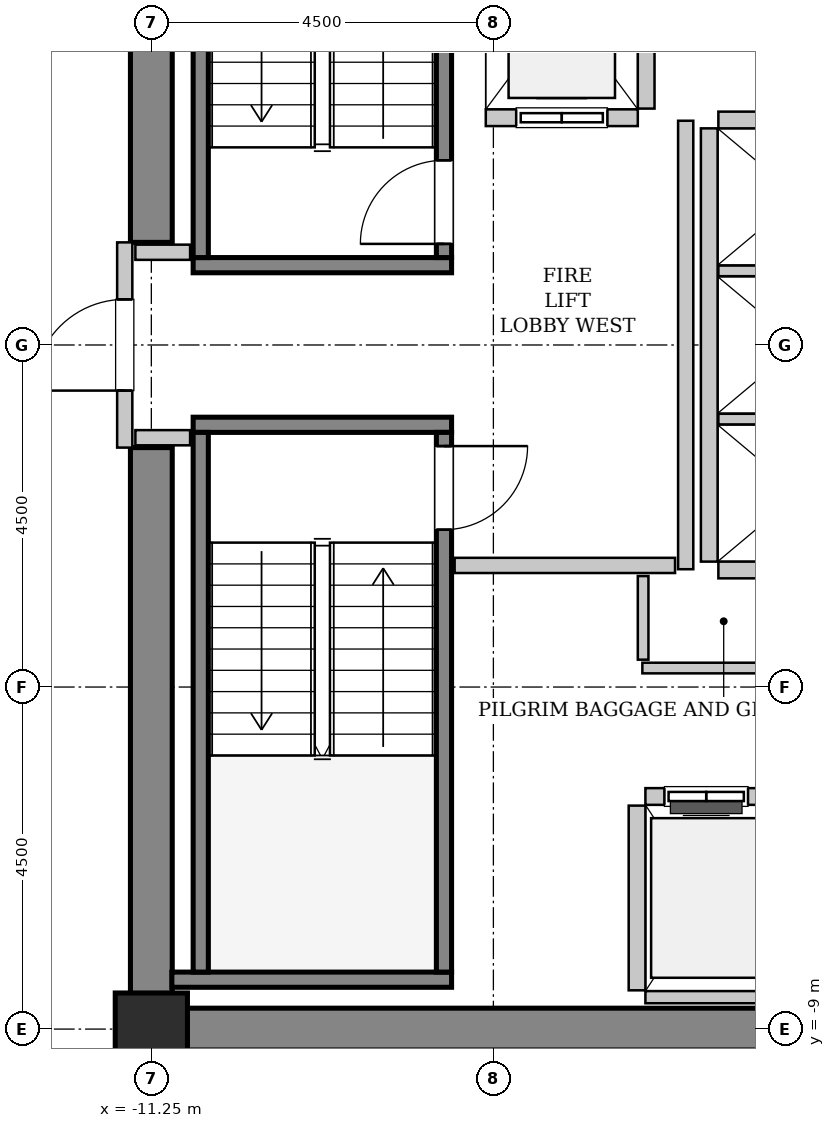
"""IFC4 building model, lengths in metres.
Left out: names, types, materials, properties, quantities, classifications, styles, units other than length and angle.
Written with IfcOpenShell. Run it as: python <this file> out.ifc"""

import sys

from ifc_helpers import new_model, si_unit, direction, frame, frame_2d, origin, origin_2d, place, context, subcontext, project, spatial, rectangle, hollow_rectangle, extrude, source, transform, mapped, element, fill, save


model = new_model("IFC4")
c1 = context("Model", 3, precision=1e-05, world=origin(), true_north=direction((0.0, 1.0)))
c2 = subcontext(c1, "Body", "Model", "MODEL_VIEW")
j1 = project(units=[si_unit("LENGTHUNIT", "METRE"), si_unit("PLANEANGLEUNIT", "RADIAN")], contexts=[c1])
p1 = place(None, origin())
s1 = spatial("IfcSite", under=j1, at=p1, CompositionType="ELEMENT")
p2 = place(p1, origin())
s2 = spatial("IfcBuilding", under=s1, at=p2, CompositionType="ELEMENT")
p3 = place(p2, frame((0.0, 0.0, 175.4)))
s3 = spatial("IfcBuildingStorey", under=s2, at=p3, CompositionType="ELEMENT", Elevation=175.4)
m1 = source(origin(), c2, "Body", "SweptSolid", [
    extrude(rectangle(XDim=9.975, YDim=0.55, at=frame_2d((4.987, 0.0))), origin(), (0.0, 0.0, 1.0), 3.8),
])
p4 = place(p3, frame((-11.525, -9.0, 0.0), z_axis=(0.0, 0.0, 1.0), x_axis=(1.0, 0.0, 0.0)))
e1 = element("IfcWall", 1, at=p4, inside=s3, PredefinedType="SHEAR", context=c2, shape_type="MappedRepresentation", body=[
    mapped(m1, transform((0.0, 0.0, 0.0), x_axis=(1.0, 0.0, 0.0), y_axis=(0.0, 1.0, 0.0), z_axis=(0.0, 0.0, 1.0), scale=1.0)),
])
m2 = source(origin(), c2, "Body", "SweptSolid", [
    extrude(rectangle(XDim=7.375, YDim=0.55, at=frame_2d((3.688, 0.0))), origin(), (0.0, 0.0, 1.0), 3.8),
])
for number, where, z_axis, x_axis in (
    (2, (-11.25, -8.725, 0.0), (0.0, 0.0, 1.0), (0.0, 1.0, 0.0)),
    (3, (-11.25, 1.35, 0.0), (0.0, 0.0, 1.0), (0.0, 1.0, 0.0)),
):
    element("IfcWall", number, at=place(p3, frame(where, z_axis=z_axis, x_axis=x_axis)), inside=s3, PredefinedType="SHEAR", context=c2, shape_type="MappedRepresentation", body=[
        mapped(m2, transform((0.0, 0.0, 0.0), x_axis=(1.0, 0.0, 0.0), y_axis=(0.0, 1.0, 0.0), z_axis=(0.0, 0.0, 1.0), scale=1.0)),
    ])
m3 = source(origin(), c2, "Body", "SweptSolid", [
    extrude(hollow_rectangle(XDim=0.95, YDim=0.95, WallThickness=0.045, InnerFilletRadius=0.045, OuterFilletRadius=0.09, at=origin_2d()), origin(), (0.0, 0.0, 1.0), 3.8),
])
p5 = place(p3, frame((-11.25, -9.0, 0.0), z_axis=(0.0, 0.0, 1.0), x_axis=(1.0, 0.0, 0.0)))
e4 = element("IfcColumn", 4, at=p5, inside=s3, PredefinedType="COLUMN", context=c2, shape_type="MappedRepresentation", body=[
    mapped(m3, transform((0.0, 0.0, 0.0), x_axis=(1.0, 0.0, 0.0), y_axis=(0.0, 1.0, 0.0), z_axis=(0.0, 0.0, 1.0), scale=1.0)),
])
m4 = source(origin(), c2, "Body", "SweptSolid", [
    extrude(rectangle(XDim=3.4, YDim=0.2, at=frame_2d((1.7, 0.0))), origin(), (0.0, 0.0, 1.0), 3.8),
])
p6 = place(p3, frame((-7.3, 1.05, 0.0), z_axis=(0.0, 0.0, 1.0), x_axis=(-1.0, 0.0, 0.0)))
e5 = element("IfcWall", 5, at=p6, inside=s3, PredefinedType="SOLIDWALL", context=c2, shape_type="MappedRepresentation", body=[
    mapped(m4, transform((0.0, 0.0, 0.0), x_axis=(1.0, 0.0, 0.0), y_axis=(0.0, 1.0, 0.0), z_axis=(0.0, 0.0, 1.0), scale=1.0)),
])
m5 = source(origin(), c2, "Body", "SweptSolid", [
    extrude(rectangle(XDim=7.1, YDim=0.2, at=frame_2d((3.55, 0.0))), origin(), (0.0, 0.0, 1.0), 3.8),
])
p7 = place(p3, frame((-7.4, 1.15, 0.0), z_axis=(0.0, 0.0, 1.0), x_axis=(0.0, 1.0, 0.0)))
e6 = element("IfcWall", 6, at=p7, inside=s3, PredefinedType="SOLIDWALL", context=c2, shape_type="MappedRepresentation", body=[
    mapped(m5, transform((0.0, 0.0, 0.0), x_axis=(1.0, 0.0, 0.0), y_axis=(0.0, 1.0, 0.0), z_axis=(0.0, 0.0, 1.0), scale=1.0)),
])
p8 = place(p7, frame((0.18, 0.0, 0.0)))
e7 = element("IfcOpeningElement", 7, at=p8, cuts=e6, PredefinedType="OPENING", context=c2, shape_type="SweptSolid", body=[
    extrude(rectangle(XDim=1.1, YDim=2.15, at=frame_2d((0.55, 1.075))), frame((0.0, 0.11, 0.0), z_axis=(0.0, -1.0, 0.0), x_axis=(1.0, 0.0, 0.0)), (0.0, 0.0, 1.0), 0.22),
])
p9 = place(p3, frame((-10.6, 1.15, 0.0), z_axis=(0.0, 0.0, 1.0), x_axis=(0.0, 1.0, 0.0)))
e8 = element("IfcWall", 8, at=p9, inside=s3, PredefinedType="SOLIDWALL", context=c2, shape_type="MappedRepresentation", body=[
    mapped(m5, transform((0.0, 0.0, 0.0), x_axis=(1.0, 0.0, 0.0), y_axis=(0.0, 1.0, 0.0), z_axis=(0.0, 0.0, 1.0), scale=1.0)),
])
p10 = place(p3, frame((-10.7, -1.05, 0.0), z_axis=(0.0, 0.0, 1.0), x_axis=(1.0, 0.0, 0.0)))
e9 = element("IfcWall", 9, at=p10, inside=s3, PredefinedType="SOLIDWALL", context=c2, shape_type="MappedRepresentation", body=[
    mapped(m4, transform((0.0, 0.0, 0.0), x_axis=(1.0, 0.0, 0.0), y_axis=(0.0, 1.0, 0.0), z_axis=(0.0, 0.0, 1.0), scale=1.0)),
])
m6 = source(origin(), c2, "Body", "SweptSolid", [
    extrude(rectangle(XDim=3.68, YDim=0.2, at=frame_2d((1.84, 0.0))), origin(), (0.0, 0.0, 1.0), 3.8),
])
p11 = place(p3, frame((-10.98, -8.35, 0.0), z_axis=(0.0, 0.0, 1.0), x_axis=(1.0, 0.0, 0.0)))
e10 = element("IfcWall", 10, at=p11, inside=s3, PredefinedType="SOLIDWALL", context=c2, shape_type="MappedRepresentation", body=[
    mapped(m6, transform((0.0, 0.0, 0.0), x_axis=(1.0, 0.0, 0.0), y_axis=(0.0, 1.0, 0.0), z_axis=(0.0, 0.0, 1.0), scale=1.0)),
])
p12 = place(p3, frame((-10.6, -1.15, 0.0), z_axis=(0.0, 0.0, 1.0), x_axis=(0.0, -1.0, 0.0)))
e11 = element("IfcWall", 11, at=p12, inside=s3, PredefinedType="SOLIDWALL", context=c2, shape_type="MappedRepresentation", body=[
    mapped(m5, transform((0.0, 0.0, 0.0), x_axis=(1.0, 0.0, 0.0), y_axis=(0.0, 1.0, 0.0), z_axis=(0.0, 0.0, 1.0), scale=1.0)),
])
p13 = place(p3, frame((-7.4, -1.15, 0.0), z_axis=(0.0, 0.0, 1.0), x_axis=(0.0, -1.0, 0.0)))
e12 = element("IfcWall", 12, at=p13, inside=s3, PredefinedType="SOLIDWALL", context=c2, shape_type="MappedRepresentation", body=[
    mapped(m5, transform((0.0, 0.0, 0.0), x_axis=(1.0, 0.0, 0.0), y_axis=(0.0, 1.0, 0.0), z_axis=(0.0, 0.0, 1.0), scale=1.0)),
])
p14 = place(p13, frame((0.18, 0.0, 0.0)))
e13 = element("IfcOpeningElement", 13, at=p14, cuts=e12, PredefinedType="OPENING", context=c2, shape_type="SweptSolid", body=[
    extrude(rectangle(XDim=1.1, YDim=2.15, at=frame_2d((0.55, 1.075))), frame((0.0, 0.11, 0.0), z_axis=(0.0, -1.0, 0.0), x_axis=(1.0, 0.0, 0.0)), (0.0, 0.0, 1.0), 0.22),
])
m7 = source(origin(), c2, "Body", "SweptSolid", [
    extrude(rectangle(XDim=2.0, YDim=0.22, at=frame_2d((1.0, 0.0))), origin(), (0.0, 0.0, 1.0), 3.535),
])
p15 = place(p3, frame((-6.85, 2.99, 0.0), z_axis=(0.0, 0.0, 1.0), x_axis=(1.0, 0.0, 0.0)))
e14 = element("IfcWall", 14, at=p15, inside=s3, PredefinedType="SOLIDWALL", context=c2, shape_type="MappedRepresentation", body=[
    mapped(m7, transform((0.0, 0.0, 0.0), x_axis=(1.0, 0.0, 0.0), y_axis=(0.0, 1.0, 0.0), z_axis=(0.0, 0.0, 1.0), scale=1.0)),
])
p16 = place(p15, frame((0.4, 0.0, 0.0)))
e15 = element("IfcOpeningElement", 15, at=p16, cuts=e14, PredefinedType="OPENING", context=c2, shape_type="SweptSolid", body=[
    extrude(rectangle(XDim=1.2, YDim=2.2, at=frame_2d((0.6, 1.1))), frame((0.0, 0.12, 0.0), z_axis=(0.0, -1.0, 0.0), x_axis=(1.0, 0.0, 0.0)), (0.0, 0.0, 1.0), 0.24),
])
m8 = source(origin(), c2, "Body", "SweptSolid", [
    extrude(rectangle(XDim=2.68, YDim=0.22, at=frame_2d((1.34, 0.0))), origin(), (0.0, 0.0, 1.0), 3.535),
])
p17 = place(p3, frame((-4.74, 3.11, 0.0), z_axis=(0.0, 0.0, 1.0), x_axis=(0.0, 1.0, 0.0)))
e16 = element("IfcWall", 16, at=p17, inside=s3, PredefinedType="SOLIDWALL", context=c2, shape_type="MappedRepresentation", body=[
    mapped(m8, transform((0.0, 0.0, 0.0), x_axis=(1.0, 0.0, 0.0), y_axis=(0.0, 1.0, 0.0), z_axis=(0.0, 0.0, 1.0), scale=1.0)),
])
m9 = source(origin(), c2, "Body", "SweptSolid", [
    extrude(rectangle(XDim=3.2, YDim=0.22, at=frame_2d((1.6, 0.0))), origin(), (0.0, 0.0, 1.0), 3.535),
])
p18 = place(p3, frame((-1.55, -5.94, 0.0), z_axis=(0.0, 0.0, 1.0), x_axis=(-1.0, 0.0, 0.0)))
e17 = element("IfcWall", 17, at=p18, inside=s3, PredefinedType="SOLIDWALL", context=c2, shape_type="MappedRepresentation", body=[
    mapped(m9, transform((0.0, 0.0, 0.0), x_axis=(1.0, 0.0, 0.0), y_axis=(0.0, 1.0, 0.0), z_axis=(0.0, 0.0, 1.0), scale=1.0)),
])
p19 = place(p18, frame((1.85, 0.0, 0.0)))
e18 = element("IfcOpeningElement", 18, at=p19, cuts=e17, PredefinedType="OPENING", context=c2, shape_type="SweptSolid", body=[
    extrude(rectangle(XDim=1.1, YDim=2.2, at=frame_2d((0.55, 1.1))), frame((0.0, 0.12, 0.0), z_axis=(0.0, -1.0, 0.0), x_axis=(1.0, 0.0, 0.0)), (0.0, 0.0, 1.0), 0.24),
])
p20 = place(p18, frame((0.225, 0.0, 0.0)))
e19 = element("IfcOpeningElement", 19, at=p20, cuts=e17, PredefinedType="OPENING", context=c2, shape_type="SweptSolid", body=[
    extrude(rectangle(XDim=1.1, YDim=2.2, at=frame_2d((0.55, 1.1))), frame((0.0, 0.12, 0.0), z_axis=(0.0, -1.0, 0.0), x_axis=(1.0, 0.0, 0.0)), (0.0, 0.0, 1.0), 0.24),
])
m10 = source(origin(), c2, "Body", "SweptSolid", [
    extrude(rectangle(XDim=3.2, YDim=0.16, at=frame_2d((1.6, 0.0))), origin(), (0.0, 0.0, 1.0), 2.425),
])
p21 = place(p3, frame((-4.75, -8.58, 0.0), z_axis=(0.0, 0.0, 1.0), x_axis=(1.0, 0.0, 0.0)))
e20 = element("IfcWall", 20, at=p21, inside=s3, PredefinedType="PARTITIONING", context=c2, shape_type="MappedRepresentation", body=[
    mapped(m10, transform((0.0, 0.0, 0.0), x_axis=(1.0, 0.0, 0.0), y_axis=(0.0, 1.0, 0.0), z_axis=(0.0, 0.0, 1.0), scale=1.0)),
])
m11 = source(origin(), c2, "Body", "SweptSolid", [
    extrude(rectangle(XDim=2.43, YDim=0.22, at=frame_2d((1.215, 0.0))), origin(), (0.0, 0.0, 1.0), 3.535),
])
p22 = place(p3, frame((-4.86, -6.06, 0.0), z_axis=(0.0, 0.0, 1.0), x_axis=(0.0, -1.0, 0.0)))
e21 = element("IfcWall", 21, at=p22, inside=s3, PredefinedType="SOLIDWALL", context=c2, shape_type="MappedRepresentation", body=[
    mapped(m11, transform((0.0, 0.0, 0.0), x_axis=(1.0, 0.0, 0.0), y_axis=(0.0, 1.0, 0.0), z_axis=(0.0, 0.0, 1.0), scale=1.0)),
])
m12 = source(origin(), c2, "Body", "SweptSolid", [
    extrude(rectangle(XDim=5.7, YDim=0.22, at=frame_2d((2.85, 0.0))), origin(), (0.0, 0.0, 1.0), 3.535),
])
p23 = place(p3, frame((-3.91, 2.85, 0.0), z_axis=(0.0, 0.0, 1.0), x_axis=(0.0, -1.0, 0.0)))
e22 = element("IfcWall", 22, at=p23, inside=s3, PredefinedType="SOLIDWALL", context=c2, shape_type="MappedRepresentation", body=[
    mapped(m12, transform((0.0, 0.0, 0.0), x_axis=(1.0, 0.0, 0.0), y_axis=(0.0, 1.0, 0.0), z_axis=(0.0, 0.0, 1.0), scale=1.0)),
])
m13 = source(origin(), c2, "Body", "SweptSolid", [
    extrude(rectangle(XDim=2.13, YDim=0.22, at=frame_2d((1.065, 0.0))), origin(), (0.0, 0.0, 1.0), 3.535),
])
p24 = place(p3, frame((-3.79, -2.96, 0.0), z_axis=(0.0, 0.0, 1.0), x_axis=(1.0, 0.0, 0.0)))
e23 = element("IfcWall", 23, at=p24, inside=s3, PredefinedType="SOLIDWALL", context=c2, shape_type="MappedRepresentation", body=[
    mapped(m13, transform((0.0, 0.0, 0.0), x_axis=(1.0, 0.0, 0.0), y_axis=(0.0, 1.0, 0.0), z_axis=(0.0, 0.0, 1.0), scale=1.0)),
])
m14 = source(origin(), c2, "Body", "SweptSolid", [
    extrude(rectangle(XDim=2.13, YDim=0.14, at=frame_2d((1.065, 0.0))), origin(), (0.0, 0.0, 1.0), 3.535),
])
for number, where, z_axis, x_axis in (
    (24, (-3.79, -0.975, 0.0), (0.0, 0.0, 1.0), (1.0, 0.0, 0.0)),
    (25, (-3.79, 0.975, 0.0), (0.0, 0.0, 1.0), (1.0, 0.0, 0.0)),
):
    element("IfcWall", number, at=place(p3, frame(where, z_axis=z_axis, x_axis=x_axis)), inside=s3, PredefinedType="PARTITIONING", context=c2, shape_type="MappedRepresentation", body=[
        mapped(m14, transform((0.0, 0.0, 0.0), x_axis=(1.0, 0.0, 0.0), y_axis=(0.0, 1.0, 0.0), z_axis=(0.0, 0.0, 1.0), scale=1.0)),
    ])
p25 = place(p3, frame((-1.66, 2.96, 0.0), z_axis=(0.0, 0.0, 1.0), x_axis=(-1.0, 0.0, 0.0)))
e26 = element("IfcWall", 26, at=p25, inside=s3, PredefinedType="SOLIDWALL", context=c2, shape_type="MappedRepresentation", body=[
    mapped(m13, transform((0.0, 0.0, 0.0), x_axis=(1.0, 0.0, 0.0), y_axis=(0.0, 1.0, 0.0), z_axis=(0.0, 0.0, 1.0), scale=1.0)),
])
m15 = source(origin(), c2, "Body", "SweptSolid", [
    extrude(rectangle(XDim=2.7, YDim=0.2, at=frame_2d((1.35, 0.0))), origin(), (0.0, 0.0, 1.0), 2.425),
])
p26 = place(p3, frame((-11.6, -1.35, 0.0), z_axis=(0.0, 0.0, 1.0), x_axis=(0.0, 1.0, 0.0)))
e27 = element("IfcWall", 27, at=p26, inside=s3, PredefinedType="PARTITIONING", context=c2, shape_type="MappedRepresentation", body=[
    mapped(m15, transform((0.0, 0.0, 0.0), x_axis=(1.0, 0.0, 0.0), y_axis=(0.0, 1.0, 0.0), z_axis=(0.0, 0.0, 1.0), scale=1.0)),
])
p27 = place(p26, frame((0.75, 0.0, 0.0)))
e28 = element("IfcOpeningElement", 28, at=p27, cuts=e27, PredefinedType="OPENING", context=c2, shape_type="SweptSolid", body=[
    extrude(rectangle(XDim=1.2, YDim=2.15, at=frame_2d((0.6, 1.075))), frame((0.0, 0.11, 0.0), z_axis=(0.0, -1.0, 0.0), x_axis=(1.0, 0.0, 0.0)), (0.0, 0.0, 1.0), 0.22),
])
m16 = source(origin(), c2, "Body", "SweptSolid", [
    extrude(rectangle(XDim=5.9, YDim=0.2, at=frame_2d((2.95, 0.0))), origin(), (0.0, 0.0, 1.0), 3.535),
])
p28 = place(p3, frame((-4.22, -2.95, 0.0), z_axis=(0.0, 0.0, 1.0), x_axis=(0.0, 1.0, 0.0)))
e29 = element("IfcWall", 29, at=p28, inside=s3, PredefinedType="PARTITIONING", context=c2, shape_type="MappedRepresentation", body=[
    mapped(m16, transform((0.0, 0.0, 0.0), x_axis=(1.0, 0.0, 0.0), y_axis=(0.0, 1.0, 0.0), z_axis=(0.0, 0.0, 1.0), scale=1.0)),
])
m17 = source(origin(), c2, "Body", "SweptSolid", [
    extrude(rectangle(XDim=2.9, YDim=0.2, at=frame_2d((1.45, 0.0))), origin(), (0.0, 0.0, 1.0), 3.535),
])
p29 = place(p3, frame((-7.26, -2.9, 0.0), z_axis=(0.0, 0.0, 1.0), x_axis=(1.0, 0.0, 0.0)))
e30 = element("IfcWall", 30, at=p29, inside=s3, PredefinedType="PARTITIONING", context=c2, shape_type="MappedRepresentation", body=[
    mapped(m17, transform((0.0, 0.0, 0.0), x_axis=(1.0, 0.0, 0.0), y_axis=(0.0, 1.0, 0.0), z_axis=(0.0, 0.0, 1.0), scale=1.0)),
])
m18 = source(origin(), c2, "Body", "SweptSolid", [
    extrude(rectangle(XDim=0.72, YDim=0.2, at=frame_2d((0.36, 0.0))), origin(), (0.0, 0.0, 1.0), 3.535),
])
for number, where, z_axis, x_axis in (
    (31, (-11.46, 1.22, 0.0), (0.0, 0.0, 1.0), (1.0, 0.0, 0.0)),
    (32, (-11.46, -1.22, 0.0), (0.0, 0.0, 1.0), (1.0, 0.0, 0.0)),
):
    element("IfcWall", number, at=place(p3, frame(where, z_axis=z_axis, x_axis=x_axis)), inside=s3, PredefinedType="PARTITIONING", context=c2, shape_type="MappedRepresentation", body=[
        mapped(m18, transform((0.0, 0.0, 0.0), x_axis=(1.0, 0.0, 0.0), y_axis=(0.0, 1.0, 0.0), z_axis=(0.0, 0.0, 1.0), scale=1.0)),
    ])
m19 = source(origin(), c2, "Body", "SweptSolid", [
    extrude(rectangle(XDim=3.15, YDim=0.14, at=frame_2d((1.575, 0.0))), origin(), (0.0, 0.0, 1.0), 3.535),
])
p30 = place(p3, frame((-4.79, -4.25, 0.0), z_axis=(0.0, 0.0, 1.0), x_axis=(1.0, 0.0, 0.0)))
e33 = element("IfcWall", 33, at=p30, inside=s3, PredefinedType="PARTITIONING", context=c2, shape_type="MappedRepresentation", body=[
    mapped(m19, transform((0.0, 0.0, 0.0), x_axis=(1.0, 0.0, 0.0), y_axis=(0.0, 1.0, 0.0), z_axis=(0.0, 0.0, 1.0), scale=1.0)),
])
m20 = source(origin(), c2, "Body", "SweptSolid", [
    extrude(rectangle(XDim=1.1, YDim=0.14, at=frame_2d((0.55, 0.0))), origin(), (0.0, 0.0, 1.0), 3.535),
])
p31 = place(p3, frame((-4.78, -4.14, 0.0), z_axis=(0.0, 0.0, 1.0), x_axis=(0.0, 1.0, 0.0)))
e34 = element("IfcWall", 34, at=p31, inside=s3, PredefinedType="PARTITIONING", context=c2, shape_type="MappedRepresentation", body=[
    mapped(m20, transform((0.0, 0.0, 0.0), x_axis=(1.0, 0.0, 0.0), y_axis=(0.0, 1.0, 0.0), z_axis=(0.0, 0.0, 1.0), scale=1.0)),
])
m21 = source(origin(), c2, "Body", "SweptSolid", [
    extrude(rectangle(XDim=1.1, YDim=2.15, at=frame_2d((0.55, 1.075))), frame((0.0, 0.025, 0.0), z_axis=(0.0, -1.0, 0.0), x_axis=(1.0, 0.0, 0.0)), (0.0, 0.0, 1.0), 0.05),
])
p32 = place(p8, origin())
e35 = element("IfcDoor", 35, at=p32, inside=s3, OperationType="SINGLE_SWING_LEFT", PredefinedType="DOOR", context=c2, shape_type="MappedRepresentation", body=[
    mapped(m21, transform((0.0, 0.0, 0.0), x_axis=(1.0, 0.0, 0.0), y_axis=(0.0, 1.0, 0.0), z_axis=(0.0, 0.0, 1.0), scale=1.0)),
])
fill(e7, e35)
p33 = place(p14, origin())
e36 = element("IfcDoor", 36, at=p33, inside=s3, OperationType="SINGLE_SWING_LEFT", PredefinedType="DOOR", context=c2, shape_type="MappedRepresentation", body=[
    mapped(m21, transform((0.0, 0.0, 0.0), x_axis=(1.0, 0.0, 0.0), y_axis=(0.0, 1.0, 0.0), z_axis=(0.0, 0.0, 1.0), scale=1.0)),
])
fill(e13, e36)
m22 = source(origin(), c2, "Body", "SweptSolid", [
    extrude(rectangle(XDim=1.2, YDim=2.2, at=frame_2d((0.6, 1.1))), frame((0.0, 0.025, 0.0), z_axis=(0.0, -1.0, 0.0), x_axis=(1.0, 0.0, 0.0)), (0.0, 0.0, 1.0), 0.05),
])
p34 = place(p16, origin())
e37 = element("IfcDoor", 37, at=p34, inside=s3, OperationType="SLIDING_TO_LEFT", PredefinedType="DOOR", context=c2, shape_type="MappedRepresentation", body=[
    mapped(m22, transform((0.0, 0.0, 0.0), x_axis=(1.0, 0.0, 0.0), y_axis=(0.0, 1.0, 0.0), z_axis=(0.0, 0.0, 1.0), scale=1.0)),
])
fill(e15, e37)
m23 = source(origin(), c2, "Body", "SweptSolid", [
    extrude(rectangle(XDim=1.1, YDim=2.2, at=frame_2d((0.55, 1.1))), frame((0.0, 0.025, 0.0), z_axis=(0.0, -1.0, 0.0), x_axis=(1.0, 0.0, 0.0)), (0.0, 0.0, 1.0), 0.05),
])
p35 = place(p19, origin())
e38 = element("IfcDoor", 38, at=p35, inside=s3, OperationType="DOUBLE_DOOR_SLIDING", PredefinedType="DOOR", context=c2, shape_type="MappedRepresentation", body=[
    mapped(m23, transform((0.0, 0.0, 0.0), x_axis=(1.0, 0.0, 0.0), y_axis=(0.0, 1.0, 0.0), z_axis=(0.0, 0.0, 1.0), scale=1.0)),
])
fill(e18, e38)
m24 = source(origin(), c2, "Body", "SweptSolid", [
    extrude(rectangle(XDim=1.2, YDim=2.15, at=frame_2d((0.6, 1.075))), frame((0.0, 0.025, 0.0), z_axis=(0.0, -1.0, 0.0), x_axis=(1.0, 0.0, 0.0)), (0.0, 0.0, 1.0), 0.05),
])
p36 = place(p27, origin())
e39 = element("IfcDoor", 39, at=p36, inside=s3, OperationType="SINGLE_SWING_LEFT", PredefinedType="DOOR", context=c2, shape_type="MappedRepresentation", body=[
    mapped(m24, transform((0.0, 0.0, 0.0), x_axis=(1.0, 0.0, 0.0), y_axis=(0.0, 1.0, 0.0), z_axis=(0.0, 0.0, 1.0), scale=1.0)),
])
fill(e28, e39)
save(model, sys.argv[1])
